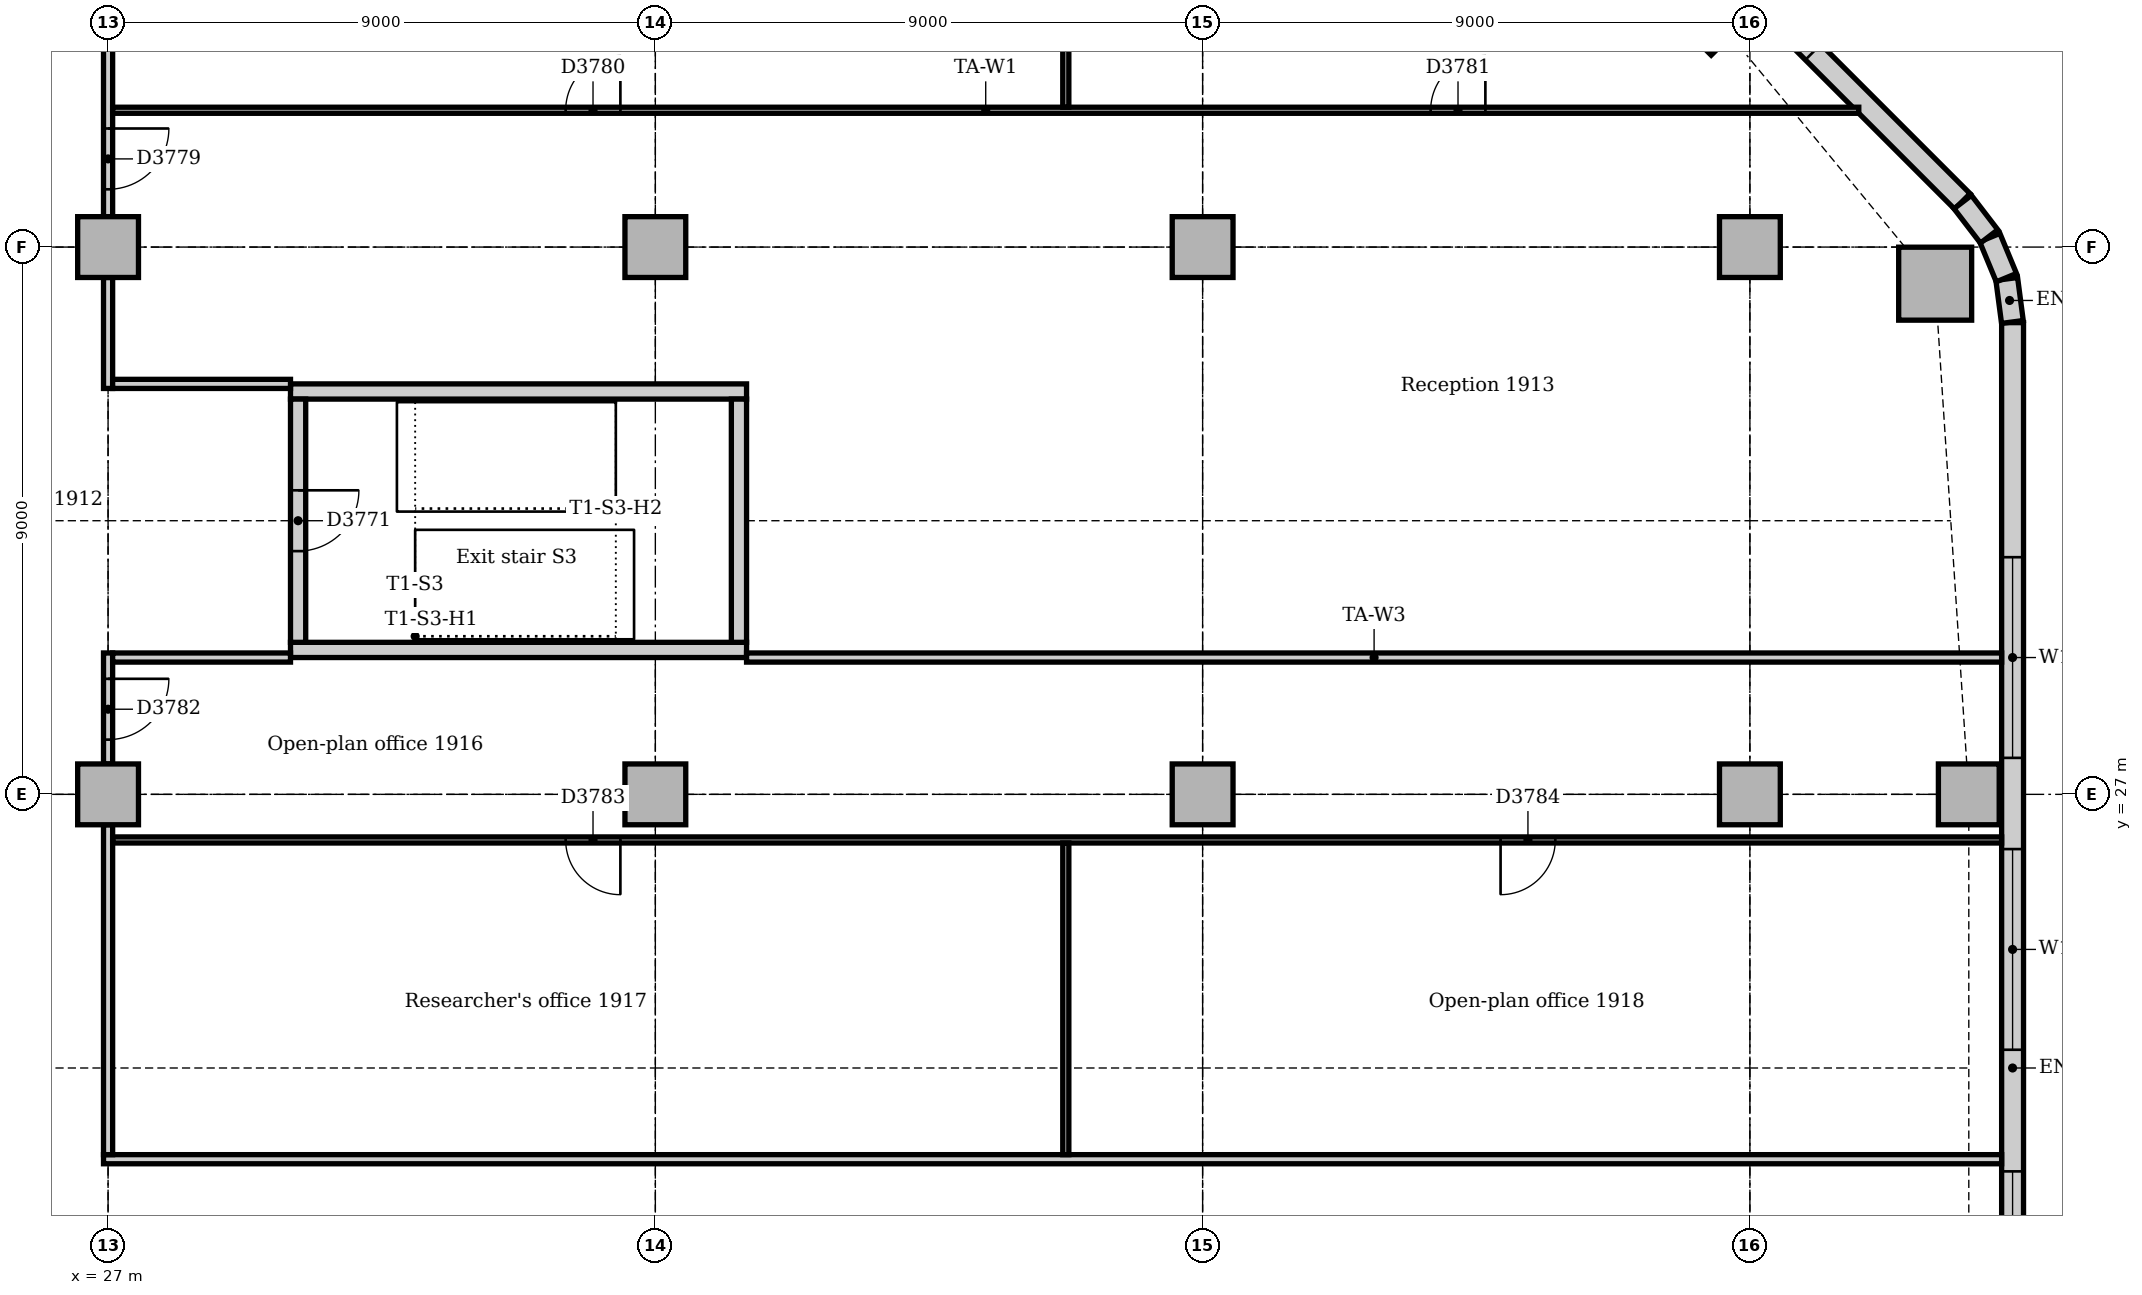
"""IFC4 building model, lengths in metres.
Left out: names, types, materials, properties, quantities, classifications, styles, units other than length and angle.
Written with IfcOpenShell. Run it as: python <this file> out.ifc"""

import sys

from ifc_helpers import new_model, si_unit, direction, frame, frame_2d, origin, origin_2d, place, context, subcontext, project, spatial, rectangle, extrude, element, fill, save


model = new_model("IFC4")
c1 = context("Model", 3, precision=1e-05, world=origin(), true_north=direction((0.0, 1.0)))
c2 = subcontext(c1, "Body", "Model", "MODEL_VIEW")
j1 = project(units=[si_unit("LENGTHUNIT", "METRE"), si_unit("PLANEANGLEUNIT", "RADIAN")], contexts=[c1])
p1 = place(None, origin())
s1 = spatial("IfcSite", under=j1, at=p1, CompositionType="ELEMENT")
p2 = place(p1, origin())
s2 = spatial("IfcBuilding", under=s1, at=p2, CompositionType="ELEMENT")
p3 = place(p2, frame((0.0, 0.0, 83.0)))
s3 = spatial("IfcBuildingStorey", under=s2, at=p3, CompositionType="ELEMENT", Elevation=83.0)
for number, where, z_axis, x_axis in (
    (1, (30.0, 29.375, 0.0), (0.0, 0.0, 1.0), (1.0, 0.0, 0.0)),
    (2, (37.5, 33.625, 0.0), (0.0, 0.0, 1.0), (-1.0, 0.0, 0.0)),
):
    element("IfcWall", number, at=place(p3, frame(where, z_axis=z_axis, x_axis=x_axis)), inside=s3, PredefinedType="SOLIDWALL", context=c2, shape_type="SweptSolid", body=[
        extrude(rectangle(XDim=7.5, YDim=0.25, at=frame_2d((3.75, 0.0))), origin(), (0.0, 0.0, 1.0), 4.0),
    ])
p4 = place(p3, frame((37.375, 29.5, 0.0), z_axis=(0.0, 0.0, 1.0), x_axis=(0.0, 1.0, 0.0)))
e3 = element("IfcWall", 3, at=p4, inside=s3, PredefinedType="SOLIDWALL", context=c2, shape_type="SweptSolid", body=[
    extrude(rectangle(XDim=4.0, YDim=0.25, at=frame_2d((2.0, 0.0))), origin(), (0.0, 0.0, 1.0), 4.0),
])
p5 = place(p3, frame((30.125, 33.5, 0.0), z_axis=(0.0, 0.0, 1.0), x_axis=(0.0, -1.0, 0.0)))
e4 = element("IfcWall", 4, at=p5, inside=s3, PredefinedType="SOLIDWALL", context=c2, shape_type="SweptSolid", body=[
    extrude(rectangle(XDim=4.0, YDim=0.25, at=frame_2d((2.0, 0.0))), origin(), (0.0, 0.0, 1.0), 4.0),
])
p6 = place(p5, frame((1.5, 0.0, 0.0)))
e5 = element("IfcOpeningElement", 5, at=p6, cuts=e4, PredefinedType="OPENING", context=c2, shape_type="SweptSolid", body=[
    extrude(rectangle(XDim=1.0, YDim=2.1, at=frame_2d((0.5, 1.05))), frame((0.0, 0.135, 0.0), z_axis=(0.0, -1.0, 0.0), x_axis=(1.0, 0.0, 0.0)), (0.0, 0.0, 1.0), 0.27),
])
p7 = place(p3, frame((57.047, 35.398, 0.0), z_axis=(0.0, 0.0, 1.0), x_axis=(1.0, 0.0, 0.0)))
e6 = element("IfcColumn", 6, at=p7, inside=s3, PredefinedType="COLUMN", context=c2, shape_type="SweptSolid", body=[
    extrude(rectangle(XDim=1.2, YDim=1.2, at=origin_2d()), origin(), (0.0, 0.0, 1.0), 3.85),
])
for number, where, z_axis, x_axis in (
    (7, (57.6, 27.0, 0.0), (0.0, 0.0, 1.0), (1.0, 0.0, 0.0)),
    (8, (53.364, 39.864, 0.0), (0.0, 0.0, 1.0), (0.707, 0.707, 0.0)),
    (9, (27.0, 27.0, 0.0), (0.0, 0.0, 1.0), (1.0, 0.0, 0.0)),
    (10, (27.0, 36.0, 0.0), (0.0, 0.0, 1.0), (1.0, 0.0, 0.0)),
    (11, (36.0, 27.0, 0.0), (0.0, 0.0, 1.0), (1.0, 0.0, 0.0)),
    (12, (36.0, 36.0, 0.0), (0.0, 0.0, 1.0), (1.0, 0.0, 0.0)),
    (13, (45.0, 27.0, 0.0), (0.0, 0.0, 1.0), (1.0, 0.0, 0.0)),
    (14, (45.0, 36.0, 0.0), (0.0, 0.0, 1.0), (1.0, 0.0, 0.0)),
    (15, (54.0, 27.0, 0.0), (0.0, 0.0, 1.0), (1.0, 0.0, 0.0)),
    (16, (54.0, 36.0, 0.0), (0.0, 0.0, 1.0), (1.0, 0.0, 0.0)),
):
    element("IfcColumn", number, at=place(p3, frame(where, z_axis=z_axis, x_axis=x_axis)), inside=s3, PredefinedType="COLUMN", context=c2, shape_type="SweptSolid", body=[
        extrude(rectangle(XDim=1.0, YDim=1.0, at=origin_2d()), origin(), (0.0, 0.0, 1.0), 3.85),
    ])
p8 = place(p3, frame((58.32, 10.243, 0.0), z_axis=(0.0, 0.0, 1.0), x_axis=(0.0, 1.0, 0.0)))
e17 = element("IfcWall", 17, at=p8, inside=s3, PredefinedType="STANDARD", context=c2, shape_type="SweptSolid", body=[
    extrude(rectangle(XDim=24.515, YDim=0.36, at=frame_2d((12.257, 0.0))), origin(), (0.0, 0.0, 1.0), 3.85),
])
p9 = place(p8, frame((4.907, 0.0, 0.9)))
e18 = element("IfcOpeningElement", 18, at=p9, cuts=e17, PredefinedType="OPENING", context=c2, shape_type="SweptSolid", body=[
    extrude(rectangle(XDim=1.8, YDim=1.6, at=frame_2d((0.9, 0.8))), frame((0.0, 0.19, 0.0), z_axis=(0.0, -1.0, 0.0), x_axis=(1.0, 0.0, 0.0)), (0.0, 0.0, 1.0), 0.38),
])
p10 = place(p8, frame((8.757, 0.0, 0.9)))
e19 = element("IfcOpeningElement", 19, at=p10, cuts=e17, PredefinedType="OPENING", context=c2, shape_type="SweptSolid", body=[
    extrude(rectangle(XDim=1.8, YDim=1.6, at=frame_2d((0.9, 0.8))), frame((0.0, 0.19, 0.0), z_axis=(0.0, -1.0, 0.0), x_axis=(1.0, 0.0, 0.0)), (0.0, 0.0, 1.0), 0.38),
])
p11 = place(p8, frame((12.557, 0.0, 0.9)))
e20 = element("IfcOpeningElement", 20, at=p11, cuts=e17, PredefinedType="OPENING", context=c2, shape_type="SweptSolid", body=[
    extrude(rectangle(XDim=3.3, YDim=1.6, at=frame_2d((1.65, 0.8))), frame((0.0, 0.19, 0.0), z_axis=(0.0, -1.0, 0.0), x_axis=(1.0, 0.0, 0.0)), (0.0, 0.0, 1.0), 0.38),
])
p12 = place(p8, frame((17.357, 0.0, 0.9)))
e21 = element("IfcOpeningElement", 21, at=p12, cuts=e17, PredefinedType="OPENING", context=c2, shape_type="SweptSolid", body=[
    extrude(rectangle(XDim=3.3, YDim=1.6, at=frame_2d((1.65, 0.8))), frame((0.0, 0.19, 0.0), z_axis=(0.0, -1.0, 0.0), x_axis=(1.0, 0.0, 0.0)), (0.0, 0.0, 1.0), 0.38),
])
p13 = place(p3, frame((57.494, 36.751, 0.0), z_axis=(0.0, 0.0, 1.0), x_axis=(-0.707106781187, 0.707106781187, 0.0)))
e22 = element("IfcWall", 22, at=p13, inside=s3, PredefinedType="STANDARD", context=c2, shape_type="SweptSolid", body=[
    extrude(rectangle(XDim=10.243, YDim=0.36, at=frame_2d((5.121, 0.0))), origin(), (0.0, 0.0, 1.0), 3.85),
])
p14 = place(p13, frame((3.471, 0.0, 0.9)))
e23 = element("IfcOpeningElement", 23, at=p14, cuts=e22, PredefinedType="OPENING", context=c2, shape_type="SweptSolid", body=[
    extrude(rectangle(XDim=3.3, YDim=1.6, at=frame_2d((1.65, 0.8))), frame((0.0, 0.19, 0.0), z_axis=(0.0, -1.0, 0.0), x_axis=(1.0, 0.0, 0.0)), (0.0, 0.0, 1.0), 0.38),
])
for number, where, z_axis, x_axis in (
    (24, (58.317, 34.769, 0.0), (0.0, 0.0, 1.0), (-0.131, 0.991, 0.0)),
    (25, (58.218, 35.497, 0.0), (0.0, 0.0, 1.0), (-0.383, 0.924, 0.0)),
):
    element("IfcWall", number, at=place(p3, frame(where, z_axis=z_axis, x_axis=x_axis)), inside=s3, PredefinedType="STANDARD", context=c2, shape_type="SweptSolid", body=[
        extrude(rectangle(XDim=0.713, YDim=0.36, at=frame_2d((0.356, 0.0))), origin(), (0.0, 0.0, 1.0), 3.85),
    ])
p15 = place(p3, frame((57.934, 36.175, 0.0), z_axis=(0.0, 0.0, 1.0), x_axis=(-0.608802368033, 0.793321924995, 0.0)))
e26 = element("IfcWall", 26, at=p15, inside=s3, PredefinedType="STANDARD", context=c2, shape_type="SweptSolid", body=[
    extrude(rectangle(XDim=0.713, YDim=0.36, at=frame_2d((0.357, 0.0))), origin(), (0.0, 0.0, 1.0), 3.85),
])
p16 = place(p3, frame((26.925, 21.0, 0.0), z_axis=(0.0, 0.0, 1.0), x_axis=(1.0, 0.0, 0.0)))
e27 = element("IfcWall", 27, at=p16, inside=s3, PredefinedType="PARTITIONING", context=c2, shape_type="SweptSolid", body=[
    extrude(rectangle(XDim=31.215, YDim=0.15, at=frame_2d((15.607, 0.0))), origin(), (0.0, 0.0, 1.0), 3.85),
])
p17 = place(p3, frame((27.0, 33.675, 0.0), z_axis=(0.0, 0.0, 1.0), x_axis=(0.0, 1.0, 0.0)))
e28 = element("IfcWall", 28, at=p17, inside=s3, PredefinedType="PARTITIONING", context=c2, shape_type="SweptSolid", body=[
    extrude(rectangle(XDim=1.825, YDim=0.15, at=frame_2d((0.912, 0.0))), origin(), (0.0, 0.0, 1.0), 3.158),
])
p18 = place(p3, frame((27.0, 36.5, 0.0), z_axis=(0.0, 0.0, 1.0), x_axis=(0.0, 1.0, 0.0)))
e29 = element("IfcWall", 29, at=p18, inside=s3, PredefinedType="PARTITIONING", context=c2, shape_type="SweptSolid", body=[
    extrude(rectangle(XDim=7.1, YDim=0.15, at=frame_2d((3.55, 0.0))), origin(), (0.0, 0.0, 1.0), 3.158),
])
p19 = place(p18, frame((0.45, 0.0, 0.0)))
e30 = element("IfcOpeningElement", 30, at=p19, cuts=e29, PredefinedType="OPENING", context=c2, shape_type="SweptSolid", body=[
    extrude(rectangle(XDim=1.0, YDim=2.1, at=frame_2d((0.5, 1.05))), frame((0.0, 0.085, 0.0), z_axis=(0.0, -1.0, 0.0), x_axis=(1.0, 0.0, 0.0)), (0.0, 0.0, 1.0), 0.17),
])
p20 = place(p3, frame((27.0, 21.075, 0.0), z_axis=(0.0, 0.0, 1.0), x_axis=(0.0, 1.0, 0.0)))
e31 = element("IfcWall", 31, at=p20, inside=s3, PredefinedType="PARTITIONING", context=c2, shape_type="SweptSolid", body=[
    extrude(rectangle(XDim=5.425, YDim=0.15, at=frame_2d((2.712, 0.0))), origin(), (0.0, 0.0, 1.0), 3.158),
])
p21 = place(p3, frame((27.0, 27.5, 0.0), z_axis=(0.0, 0.0, 1.0), x_axis=(0.0, 1.0, 0.0)))
e32 = element("IfcWall", 32, at=p21, inside=s3, PredefinedType="PARTITIONING", context=c2, shape_type="SweptSolid", body=[
    extrude(rectangle(XDim=1.825, YDim=0.15, at=frame_2d((0.912, 0.0))), origin(), (0.0, 0.0, 1.0), 3.158),
])
p22 = place(p21, frame((0.4, 0.0, 0.0)))
e33 = element("IfcOpeningElement", 33, at=p22, cuts=e32, PredefinedType="OPENING", context=c2, shape_type="SweptSolid", body=[
    extrude(rectangle(XDim=1.0, YDim=2.1, at=frame_2d((0.5, 1.05))), frame((0.0, 0.085, 0.0), z_axis=(0.0, -1.0, 0.0), x_axis=(1.0, 0.0, 0.0)), (0.0, 0.0, 1.0), 0.17),
])
for number, where, z_axis, x_axis in (
    (34, (27.075, 29.25, 0.0), (0.0, 0.0, 1.0), (1.0, 0.0, 0.0)),
    (35, (27.075, 33.75, 0.0), (0.0, 0.0, 1.0), (1.0, 0.0, 0.0)),
):
    element("IfcWall", number, at=place(p3, frame(where, z_axis=z_axis, x_axis=x_axis)), inside=s3, PredefinedType="PARTITIONING", context=c2, shape_type="SweptSolid", body=[
        extrude(rectangle(XDim=2.925, YDim=0.15, at=frame_2d((1.462, 0.0))), origin(), (0.0, 0.0, 1.0), 3.85),
    ])
p23 = place(p3, frame((37.5, 29.25, 0.0), z_axis=(0.0, 0.0, 1.0), x_axis=(1.0, 0.0, 0.0)))
e36 = element("IfcWall", 36, at=p23, inside=s3, PredefinedType="PARTITIONING", context=c2, shape_type="SweptSolid", body=[
    extrude(rectangle(XDim=20.64, YDim=0.15, at=frame_2d((10.32, 0.0))), origin(), (0.0, 0.0, 1.0), 3.85),
])
p24 = place(p3, frame((27.075, 26.25, 0.0), z_axis=(0.0, 0.0, 1.0), x_axis=(1.0, 0.0, 0.0)))
e37 = element("IfcWall", 37, at=p24, inside=s3, PredefinedType="PARTITIONING", context=c2, shape_type="SweptSolid", body=[
    extrude(rectangle(XDim=31.065, YDim=0.1, at=frame_2d((15.533, 0.0))), origin(), (0.0, 0.0, 1.0), 3.85),
])
p25 = place(p24, frame((7.45, 0.0, 0.0)))
e38 = element("IfcOpeningElement", 38, at=p25, cuts=e37, PredefinedType="OPENING", context=c2, shape_type="SweptSolid", body=[
    extrude(rectangle(XDim=0.9, YDim=2.1, at=frame_2d((0.45, 1.05))), frame((0.0, 0.06, 0.0), z_axis=(0.0, -1.0, 0.0), x_axis=(1.0, 0.0, 0.0)), (0.0, 0.0, 1.0), 0.12),
])
p26 = place(p24, frame((22.825, 0.0, 0.0)))
e39 = element("IfcOpeningElement", 39, at=p26, cuts=e37, PredefinedType="OPENING", context=c2, shape_type="SweptSolid", body=[
    extrude(rectangle(XDim=0.9, YDim=2.1, at=frame_2d((0.45, 1.05))), frame((0.0, 0.06, 0.0), z_axis=(0.0, -1.0, 0.0), x_axis=(1.0, 0.0, 0.0)), (0.0, 0.0, 1.0), 0.12),
])
p27 = place(p3, frame((27.075, 38.25, 0.0), z_axis=(0.0, 0.0, 1.0), x_axis=(1.0, 0.0, 0.0)))
e40 = element("IfcWall", 40, at=p27, inside=s3, PredefinedType="PARTITIONING", context=c2, shape_type="SweptSolid", body=[
    extrude(rectangle(XDim=28.716, YDim=0.1, at=frame_2d((14.358, 0.0))), origin(), (0.0, 0.0, 1.0), 3.85),
])
p28 = place(p27, frame((7.45, 0.0, 0.0)))
e41 = element("IfcOpeningElement", 41, at=p28, cuts=e40, PredefinedType="OPENING", context=c2, shape_type="SweptSolid", body=[
    extrude(rectangle(XDim=0.9, YDim=2.1, at=frame_2d((0.45, 1.05))), frame((0.0, 0.06, 0.0), z_axis=(0.0, -1.0, 0.0), x_axis=(1.0, 0.0, 0.0)), (0.0, 0.0, 1.0), 0.12),
])
p29 = place(p27, frame((21.675, 0.0, 0.0)))
e42 = element("IfcOpeningElement", 42, at=p29, cuts=e40, PredefinedType="OPENING", context=c2, shape_type="SweptSolid", body=[
    extrude(rectangle(XDim=0.9, YDim=2.1, at=frame_2d((0.45, 1.05))), frame((0.0, 0.06, 0.0), z_axis=(0.0, -1.0, 0.0), x_axis=(1.0, 0.0, 0.0)), (0.0, 0.0, 1.0), 0.12),
])
p30 = place(p3, frame((42.75, 38.3, 0.0), z_axis=(0.0, 0.0, 1.0), x_axis=(0.0, 1.0, 0.0)))
e43 = element("IfcWall", 43, at=p30, inside=s3, PredefinedType="PARTITIONING", context=c2, shape_type="SweptSolid", body=[
    extrude(rectangle(XDim=6.34, YDim=0.1, at=frame_2d((3.17, 0.0))), origin(), (0.0, 0.0, 1.0), 3.85),
])
p31 = place(p3, frame((42.75, 21.075, 0.0), z_axis=(0.0, 0.0, 1.0), x_axis=(0.0, 1.0, 0.0)))
e44 = element("IfcWall", 44, at=p31, inside=s3, PredefinedType="PARTITIONING", context=c2, shape_type="SweptSolid", body=[
    extrude(rectangle(XDim=5.125, YDim=0.1, at=frame_2d((2.562, 0.0))), origin(), (0.0, 0.0, 1.0), 3.85),
])
p32 = place(p10, origin())
e45 = element("IfcWindow", 45, at=p32, inside=s3, PartitioningType="SINGLE_PANEL", PredefinedType="WINDOW", context=c2, shape_type="SweptSolid", body=[
    extrude(rectangle(XDim=1.8, YDim=1.6, at=frame_2d((0.9, 0.8))), frame((0.0, 0.13, 0.0), z_axis=(0.0, -1.0, 0.0), x_axis=(1.0, 0.0, 0.0)), (0.0, 0.0, 1.0), 0.06),
])
fill(e19, e45)
p33 = place(p11, origin())
e46 = element("IfcWindow", 46, at=p33, inside=s3, PartitioningType="SINGLE_PANEL", PredefinedType="WINDOW", context=c2, shape_type="SweptSolid", body=[
    extrude(rectangle(XDim=3.3, YDim=1.6, at=frame_2d((1.65, 0.8))), frame((0.0, 0.13, 0.0), z_axis=(0.0, -1.0, 0.0), x_axis=(1.0, 0.0, 0.0)), (0.0, 0.0, 1.0), 0.06),
])
fill(e20, e46)
p34 = place(p12, origin())
e47 = element("IfcWindow", 47, at=p34, inside=s3, PartitioningType="SINGLE_PANEL", PredefinedType="WINDOW", context=c2, shape_type="SweptSolid", body=[
    extrude(rectangle(XDim=3.3, YDim=1.6, at=frame_2d((1.65, 0.8))), frame((0.0, 0.13, 0.0), z_axis=(0.0, -1.0, 0.0), x_axis=(1.0, 0.0, 0.0)), (0.0, 0.0, 1.0), 0.06),
])
fill(e21, e47)
p35 = place(p14, origin())
e48 = element("IfcWindow", 48, at=p35, inside=s3, PartitioningType="SINGLE_PANEL", PredefinedType="WINDOW", context=c2, shape_type="SweptSolid", body=[
    extrude(rectangle(XDim=3.3, YDim=1.6, at=frame_2d((1.65, 0.8))), frame((0.0, 0.13, 0.0), z_axis=(0.0, -1.0, 0.0), x_axis=(1.0, 0.0, 0.0)), (0.0, 0.0, 1.0), 0.06),
])
fill(e23, e48)
p36 = place(p6, origin())
e49 = element("IfcDoor", 49, at=p36, inside=s3, OperationType="SINGLE_SWING_LEFT", PredefinedType="DOOR", context=c2, shape_type="SweptSolid", body=[
    extrude(rectangle(XDim=1.0, YDim=2.1, at=frame_2d((0.5, 1.05))), frame((0.0, 0.025, 0.0), z_axis=(0.0, -1.0, 0.0), x_axis=(1.0, 0.0, 0.0)), (0.0, 0.0, 1.0), 0.05),
])
fill(e5, e49)
p37 = place(p19, frame((1.0, 0.0, 0.0), z_axis=(0.0, 0.0, 1.0), x_axis=(-1.0, 0.0, 0.0)))
e50 = element("IfcDoor", 50, at=p37, inside=s3, OperationType="SINGLE_SWING_LEFT", PredefinedType="DOOR", context=c2, shape_type="SweptSolid", body=[
    extrude(rectangle(XDim=1.0, YDim=2.1, at=frame_2d((0.5, 1.05))), frame((0.0, 0.025, 0.0), z_axis=(0.0, -1.0, 0.0), x_axis=(1.0, 0.0, 0.0)), (0.0, 0.0, 1.0), 0.05),
])
fill(e30, e50)
p38 = place(p28, origin())
e51 = element("IfcDoor", 51, at=p38, inside=s3, OperationType="SINGLE_SWING_RIGHT", PredefinedType="DOOR", context=c2, shape_type="SweptSolid", body=[
    extrude(rectangle(XDim=0.9, YDim=2.1, at=frame_2d((0.45, 1.05))), frame((0.0, 0.025, 0.0), z_axis=(0.0, -1.0, 0.0), x_axis=(1.0, 0.0, 0.0)), (0.0, 0.0, 1.0), 0.05),
])
fill(e41, e51)
p39 = place(p29, origin())
e52 = element("IfcDoor", 52, at=p39, inside=s3, OperationType="SINGLE_SWING_RIGHT", PredefinedType="DOOR", context=c2, shape_type="SweptSolid", body=[
    extrude(rectangle(XDim=0.9, YDim=2.1, at=frame_2d((0.45, 1.05))), frame((0.0, 0.025, 0.0), z_axis=(0.0, -1.0, 0.0), x_axis=(1.0, 0.0, 0.0)), (0.0, 0.0, 1.0), 0.05),
])
fill(e42, e52)
p40 = place(p22, frame((1.0, 0.0, 0.0), z_axis=(0.0, 0.0, 1.0), x_axis=(-1.0, 0.0, 0.0)))
e53 = element("IfcDoor", 53, at=p40, inside=s3, OperationType="SINGLE_SWING_LEFT", PredefinedType="DOOR", context=c2, shape_type="SweptSolid", body=[
    extrude(rectangle(XDim=1.0, YDim=2.1, at=frame_2d((0.5, 1.05))), frame((0.0, 0.025, 0.0), z_axis=(0.0, -1.0, 0.0), x_axis=(1.0, 0.0, 0.0)), (0.0, 0.0, 1.0), 0.05),
])
fill(e33, e53)
p41 = place(p25, frame((0.9, 0.0, 0.0), z_axis=(0.0, 0.0, 1.0), x_axis=(-1.0, 0.0, 0.0)))
e54 = element("IfcDoor", 54, at=p41, inside=s3, OperationType="SINGLE_SWING_LEFT", PredefinedType="DOOR", context=c2, shape_type="SweptSolid", body=[
    extrude(rectangle(XDim=0.9, YDim=2.1, at=frame_2d((0.45, 1.05))), frame((0.0, 0.025, 0.0), z_axis=(0.0, -1.0, 0.0), x_axis=(1.0, 0.0, 0.0)), (0.0, 0.0, 1.0), 0.05),
])
fill(e38, e54)
p42 = place(p26, frame((0.9, 0.0, 0.0), z_axis=(0.0, 0.0, 1.0), x_axis=(-1.0, 0.0, 0.0)))
e55 = element("IfcDoor", 55, at=p42, inside=s3, OperationType="SINGLE_SWING_RIGHT", PredefinedType="DOOR", context=c2, shape_type="SweptSolid", body=[
    extrude(rectangle(XDim=0.9, YDim=2.1, at=frame_2d((0.45, 1.05))), frame((0.0, 0.025, 0.0), z_axis=(0.0, -1.0, 0.0), x_axis=(1.0, 0.0, 0.0)), (0.0, 0.0, 1.0), 0.05),
])
fill(e39, e55)
save(model, sys.argv[1])
